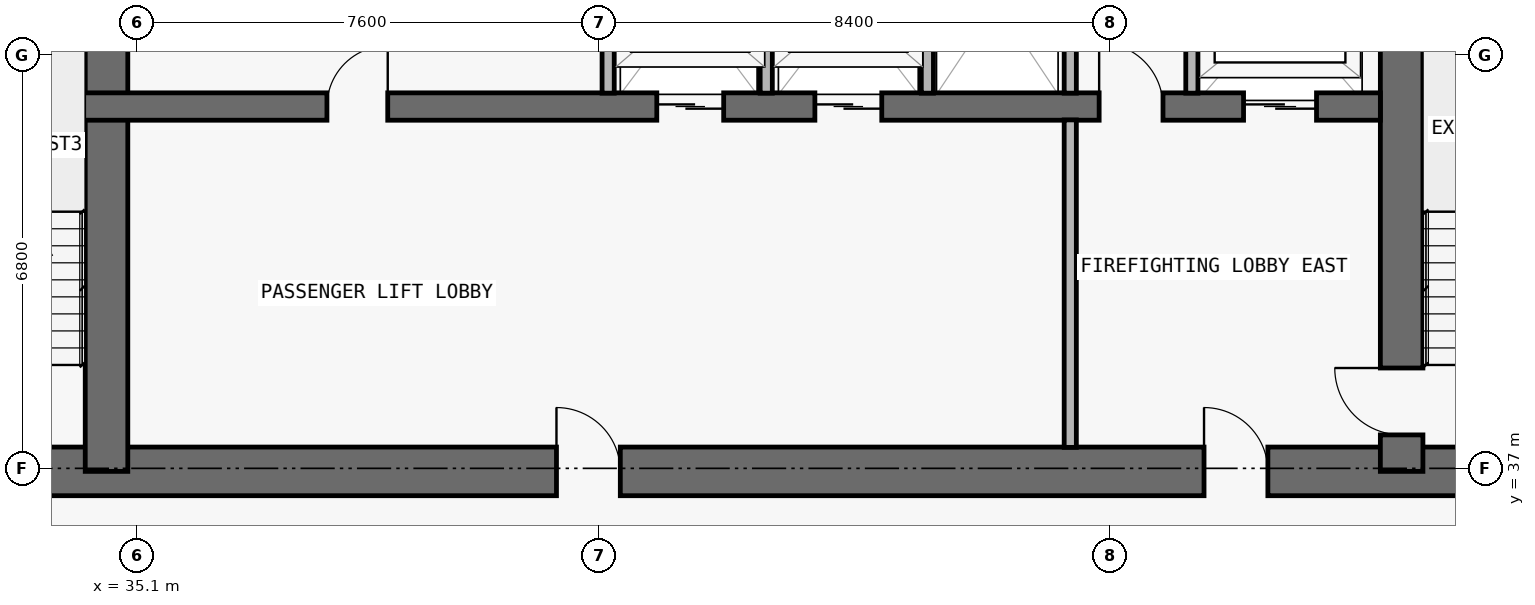
"""IFC4 building model, lengths in metres.
Left out: names, types, materials, properties, quantities, classifications, styles, units other than length and angle.
Written with IfcOpenShell. Run it as: python <this file> out.ifc"""

import sys

from ifc_helpers import new_model, si_unit, direction, frame, frame_2d, origin, place, context, subcontext, project, spatial, rectangle, extrude, element, fill, save


model = new_model("IFC4")
c1 = context("Model", 3, precision=1e-05, world=origin(), true_north=direction((0.0, 1.0)))
c2 = subcontext(c1, "Body", "Model", "MODEL_VIEW")
j1 = project(units=[si_unit("LENGTHUNIT", "METRE"), si_unit("PLANEANGLEUNIT", "RADIAN")], contexts=[c1])
p1 = place(None, origin())
s1 = spatial("IfcSite", under=j1, at=p1, CompositionType="ELEMENT")
p2 = place(p1, origin())
s2 = spatial("IfcBuilding", under=s1, at=p2, CompositionType="ELEMENT")
p3 = place(p2, frame((0.0, 0.0, 142.2)))
s3 = spatial("IfcBuildingStorey", under=s2, at=p3, CompositionType="ELEMENT", Elevation=142.2)
p4 = place(p3, frame((17.85, 36.95, 0.0), z_axis=(0.0, 0.0, 1.0), x_axis=(1.0, 0.0, 0.0)))
e1 = element("IfcWall", 1, at=p4, inside=s3, PredefinedType="SHEAR", context=c2, shape_type="SweptSolid", body=[
    extrude(rectangle(XDim=42.1, YDim=0.8, at=frame_2d((21.05, 0.0))), origin(), (0.0, 0.0, 1.0), 3.05),
])
p5 = place(p4, frame((14.45, 0.0, 0.0)))
e2 = element("IfcOpeningElement", 2, at=p5, cuts=e1, PredefinedType="OPENING", context=c2, shape_type="SweptSolid", body=[
    extrude(rectangle(XDim=1.1, YDim=2.15, at=frame_2d((0.55, 1.075))), frame((0.0, 0.41, 0.0), z_axis=(0.0, -1.0, 0.0), x_axis=(1.0, 0.0, 0.0)), (0.0, 0.0, 1.0), 0.82),
])
p6 = place(p4, frame((6.3, 0.0, 0.0)))
e3 = element("IfcOpeningElement", 3, at=p6, cuts=e1, PredefinedType="OPENING", context=c2, shape_type="SweptSolid", body=[
    extrude(rectangle(XDim=1.05, YDim=2.15, at=frame_2d((0.525, 1.075))), frame((0.0, 0.41, 0.0), z_axis=(0.0, -1.0, 0.0), x_axis=(1.0, 0.0, 0.0)), (0.0, 0.0, 1.0), 0.82),
])
p7 = place(p4, frame((34.8, 0.0, 0.0)))
e4 = element("IfcOpeningElement", 4, at=p7, cuts=e1, PredefinedType="OPENING", context=c2, shape_type="SweptSolid", body=[
    extrude(rectangle(XDim=1.05, YDim=2.15, at=frame_2d((0.525, 1.075))), frame((0.0, 0.41, 0.0), z_axis=(0.0, -1.0, 0.0), x_axis=(1.0, 0.0, 0.0)), (0.0, 0.0, 1.0), 0.82),
])
p8 = place(p4, frame((10.913, 0.0, 0.0)))
e5 = element("IfcOpeningElement", 5, at=p8, cuts=e1, PredefinedType="OPENING", context=c2, shape_type="SweptSolid", body=[
    extrude(rectangle(XDim=1.05, YDim=2.15, at=frame_2d((0.525, 1.075))), frame((0.0, 0.41, 0.0), z_axis=(0.0, -1.0, 0.0), x_axis=(1.0, 0.0, 0.0)), (0.0, 0.0, 1.0), 0.82),
])
p9 = place(p4, frame((24.15, 0.0, 0.0)))
e6 = element("IfcOpeningElement", 6, at=p9, cuts=e1, PredefinedType="OPENING", context=c2, shape_type="SweptSolid", body=[
    extrude(rectangle(XDim=1.05, YDim=2.15, at=frame_2d((0.525, 1.075))), frame((0.0, 0.41, 0.0), z_axis=(0.0, -1.0, 0.0), x_axis=(1.0, 0.0, 0.0)), (0.0, 0.0, 1.0), 0.82),
])
p10 = place(p3, frame((55.9, 36.95, 0.0), z_axis=(0.0, 0.0, 1.0), x_axis=(0.0, 1.0, 0.0)))
e7 = element("IfcWall", 7, at=p10, inside=s3, PredefinedType="SHEAR", context=c2, shape_type="SweptSolid", body=[
    extrude(rectangle(XDim=9.625, YDim=0.7, at=frame_2d((4.812, 0.0))), origin(), (0.0, 0.0, 1.0), 3.05),
])
p11 = place(p10, frame((0.6, 0.0, 0.0)))
e8 = element("IfcOpeningElement", 8, at=p11, cuts=e7, PredefinedType="OPENING", context=c2, shape_type="SweptSolid", body=[
    extrude(rectangle(XDim=1.1, YDim=2.15, at=frame_2d((0.55, 1.075))), frame((0.0, 0.36, 0.0), z_axis=(0.0, -1.0, 0.0), x_axis=(1.0, 0.0, 0.0)), (0.0, 0.0, 1.0), 0.72),
])
p12 = place(p3, frame((34.6, 36.95, 0.0), z_axis=(0.0, 0.0, 1.0), x_axis=(0.0, 1.0, 0.0)))
e9 = element("IfcWall", 9, at=p12, inside=s3, PredefinedType="SHEAR", context=c2, shape_type="SweptSolid", body=[
    extrude(rectangle(XDim=9.625, YDim=0.7, at=frame_2d((4.812, 0.0))), origin(), (0.0, 0.0, 1.0), 3.05),
])
p13 = place(p3, frame((22.25, 42.95, 0.0), z_axis=(0.0, 0.0, 1.0), x_axis=(1.0, 0.0, 0.0)))
e10 = element("IfcWall", 10, at=p13, inside=s3, PredefinedType="SHEAR", context=c2, shape_type="SweptSolid", body=[
    extrude(rectangle(XDim=33.3, YDim=0.45, at=frame_2d((16.65, 0.0))), origin(), (0.0, 0.0, 1.0), 3.05),
])
p14 = place(p13, frame((1.05, 0.0, 0.0)))
e11 = element("IfcOpeningElement", 11, at=p14, cuts=e10, PredefinedType="OPENING", context=c2, shape_type="SweptSolid", body=[
    extrude(rectangle(XDim=1.2, YDim=2.2, at=frame_2d((0.6, 1.1))), frame((0.0, 0.235, 0.0), z_axis=(0.0, -1.0, 0.0), x_axis=(1.0, 0.0, 0.0)), (0.0, 0.0, 1.0), 0.47),
])
p15 = place(p13, frame((31.05, 0.0, 0.0)))
e12 = element("IfcOpeningElement", 12, at=p15, cuts=e10, PredefinedType="OPENING", context=c2, shape_type="SweptSolid", body=[
    extrude(rectangle(XDim=1.2, YDim=2.2, at=frame_2d((0.6, 1.1))), frame((0.0, 0.235, 0.0), z_axis=(0.0, -1.0, 0.0), x_axis=(1.0, 0.0, 0.0)), (0.0, 0.0, 1.0), 0.47),
])
p16 = place(p13, frame((21.4, 0.0, 0.0)))
e13 = element("IfcOpeningElement", 13, at=p16, cuts=e10, PredefinedType="OPENING", context=c2, shape_type="SweptSolid", body=[
    extrude(rectangle(XDim=1.1, YDim=2.2, at=frame_2d((0.55, 1.1))), frame((0.0, 0.235, 0.0), z_axis=(0.0, -1.0, 0.0), x_axis=(1.0, 0.0, 0.0)), (0.0, 0.0, 1.0), 0.47),
])
p17 = place(p13, frame((24.0, 0.0, 0.0)))
e14 = element("IfcOpeningElement", 14, at=p17, cuts=e10, PredefinedType="OPENING", context=c2, shape_type="SweptSolid", body=[
    extrude(rectangle(XDim=1.1, YDim=2.2, at=frame_2d((0.55, 1.1))), frame((0.0, 0.235, 0.0), z_axis=(0.0, -1.0, 0.0), x_axis=(1.0, 0.0, 0.0)), (0.0, 0.0, 1.0), 0.47),
])
p18 = place(p13, frame((3.625, 0.0, 0.0)))
e15 = element("IfcOpeningElement", 15, at=p18, cuts=e10, PredefinedType="OPENING", context=c2, shape_type="SweptSolid", body=[
    extrude(rectangle(XDim=1.05, YDim=2.15, at=frame_2d((0.525, 1.075))), frame((0.0, 0.235, 0.0), z_axis=(0.0, -1.0, 0.0), x_axis=(1.0, 0.0, 0.0)), (0.0, 0.0, 1.0), 0.47),
])
p19 = place(p13, frame((28.675, 0.0, 0.0)))
e16 = element("IfcOpeningElement", 16, at=p19, cuts=e10, PredefinedType="OPENING", context=c2, shape_type="SweptSolid", body=[
    extrude(rectangle(XDim=1.05, YDim=2.15, at=frame_2d((0.525, 1.075))), frame((0.0, 0.235, 0.0), z_axis=(0.0, -1.0, 0.0), x_axis=(1.0, 0.0, 0.0)), (0.0, 0.0, 1.0), 0.47),
])
p20 = place(p13, frame((15.975, 0.0, 0.0)))
e17 = element("IfcOpeningElement", 17, at=p20, cuts=e10, PredefinedType="OPENING", context=c2, shape_type="SweptSolid", body=[
    extrude(rectangle(XDim=1.0, YDim=2.2, at=frame_2d((0.5, 1.1))), frame((0.0, 0.235, 0.0), z_axis=(0.0, -1.0, 0.0), x_axis=(1.0, 0.0, 0.0)), (0.0, 0.0, 1.0), 0.47),
])
for number, where, z_axis, x_axis in (
    (18, (42.85, 43.17, 0.0), (0.0, 0.0, 1.0), (0.0, 1.0, 0.0)),
    (19, (45.45, 43.17, 0.0), (0.0, 0.0, 1.0), (0.0, 1.0, 0.0)),
    (20, (48.1, 43.17, 0.0), (0.0, 0.0, 1.0), (0.0, 1.0, 0.0)),
):
    element("IfcWall", number, at=place(p3, frame(where, z_axis=z_axis, x_axis=x_axis)), inside=s3, PredefinedType="PARTITIONING", context=c2, shape_type="SweptSolid", body=[
        extrude(rectangle(XDim=3.185, YDim=0.2, at=frame_2d((1.593, 0.0))), origin(), (0.0, 0.0, 1.0), 3.05),
    ])
p21 = place(p3, frame((50.45, 37.345, 0.0), z_axis=(0.0, 0.0, 1.0), x_axis=(0.0, 1.0, 0.0)))
e21 = element("IfcWall", 21, at=p21, inside=s3, PredefinedType="PARTITIONING", context=c2, shape_type="SweptSolid", body=[
    extrude(rectangle(XDim=5.385, YDim=0.2, at=frame_2d((2.692, 0.0))), origin(), (0.0, 0.0, 1.0), 3.05),
])
for number, where, z_axis, x_axis in (
    (22, (50.45, 43.17, 0.0), (0.0, 0.0, 1.0), (0.0, 1.0, 0.0)),
    (23, (52.45, 43.17, 0.0), (0.0, 0.0, 1.0), (0.0, 1.0, 0.0)),
):
    element("IfcWall", number, at=place(p3, frame(where, z_axis=z_axis, x_axis=x_axis)), inside=s3, PredefinedType="PARTITIONING", context=c2, shape_type="SweptSolid", body=[
        extrude(rectangle(XDim=3.185, YDim=0.2, at=frame_2d((1.593, 0.0))), origin(), (0.0, 0.0, 1.0), 3.05),
    ])
p22 = place(p15, origin())
e24 = element("IfcDoor", 24, at=p22, inside=s3, OperationType="DOUBLE_DOOR_SLIDING", PredefinedType="DOOR", context=c2, shape_type="SweptSolid", body=[
    extrude(rectangle(XDim=1.2, YDim=2.2, at=frame_2d((0.6, 1.1))), frame((0.0, 0.025, 0.0), z_axis=(0.0, -1.0, 0.0), x_axis=(1.0, 0.0, 0.0)), (0.0, 0.0, 1.0), 0.05),
])
fill(e12, e24)
p23 = place(p16, origin())
e25 = element("IfcDoor", 25, at=p23, inside=s3, OperationType="DOUBLE_DOOR_SLIDING", PredefinedType="DOOR", context=c2, shape_type="SweptSolid", body=[
    extrude(rectangle(XDim=1.1, YDim=2.2, at=frame_2d((0.55, 1.1))), frame((0.0, 0.025, 0.0), z_axis=(0.0, -1.0, 0.0), x_axis=(1.0, 0.0, 0.0)), (0.0, 0.0, 1.0), 0.05),
])
fill(e13, e25)
p24 = place(p17, origin())
e26 = element("IfcDoor", 26, at=p24, inside=s3, OperationType="DOUBLE_DOOR_SLIDING", PredefinedType="DOOR", context=c2, shape_type="SweptSolid", body=[
    extrude(rectangle(XDim=1.1, YDim=2.2, at=frame_2d((0.55, 1.1))), frame((0.0, 0.025, 0.0), z_axis=(0.0, -1.0, 0.0), x_axis=(1.0, 0.0, 0.0)), (0.0, 0.0, 1.0), 0.05),
])
fill(e14, e26)
p25 = place(p7, origin())
e27 = element("IfcDoor", 27, at=p25, inside=s3, OperationType="SINGLE_SWING_LEFT", PredefinedType="DOOR", context=c2, shape_type="SweptSolid", body=[
    extrude(rectangle(XDim=1.05, YDim=2.15, at=frame_2d((0.525, 1.075))), frame((0.0, 0.025, 0.0), z_axis=(0.0, -1.0, 0.0), x_axis=(1.0, 0.0, 0.0)), (0.0, 0.0, 1.0), 0.05),
])
fill(e4, e27)
p26 = place(p11, origin())
e28 = element("IfcDoor", 28, at=p26, inside=s3, OperationType="SINGLE_SWING_RIGHT", PredefinedType="DOOR", context=c2, shape_type="SweptSolid", body=[
    extrude(rectangle(XDim=1.1, YDim=2.15, at=frame_2d((0.55, 1.075))), frame((0.0, 0.025, 0.0), z_axis=(0.0, -1.0, 0.0), x_axis=(1.0, 0.0, 0.0)), (0.0, 0.0, 1.0), 0.05),
])
fill(e8, e28)
p27 = place(p19, origin())
e29 = element("IfcDoor", 29, at=p27, inside=s3, OperationType="SINGLE_SWING_LEFT", PredefinedType="DOOR", context=c2, shape_type="SweptSolid", body=[
    extrude(rectangle(XDim=1.05, YDim=2.15, at=frame_2d((0.525, 1.075))), frame((0.0, 0.025, 0.0), z_axis=(0.0, -1.0, 0.0), x_axis=(1.0, 0.0, 0.0)), (0.0, 0.0, 1.0), 0.05),
])
fill(e16, e29)
p28 = place(p9, origin())
e30 = element("IfcDoor", 30, at=p28, inside=s3, OperationType="SINGLE_SWING_LEFT", PredefinedType="DOOR", context=c2, shape_type="SweptSolid", body=[
    extrude(rectangle(XDim=1.05, YDim=2.15, at=frame_2d((0.525, 1.075))), frame((0.0, 0.025, 0.0), z_axis=(0.0, -1.0, 0.0), x_axis=(1.0, 0.0, 0.0)), (0.0, 0.0, 1.0), 0.05),
])
fill(e6, e30)
p29 = place(p20, origin())
e31 = element("IfcDoor", 31, at=p29, inside=s3, OperationType="SINGLE_SWING_RIGHT", PredefinedType="DOOR", context=c2, shape_type="SweptSolid", body=[
    extrude(rectangle(XDim=1.0, YDim=2.2, at=frame_2d((0.5, 1.1))), frame((0.0, 0.025, 0.0), z_axis=(0.0, -1.0, 0.0), x_axis=(1.0, 0.0, 0.0)), (0.0, 0.0, 1.0), 0.05),
])
fill(e17, e31)
save(model, sys.argv[1])
